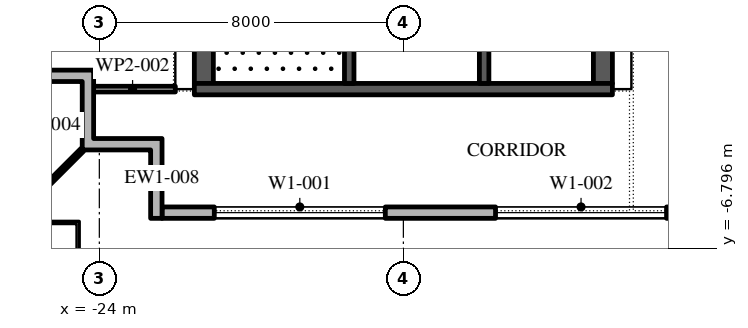
"""IFC4 building model, lengths in metres.
Left out: names, types, materials, properties, quantities, classifications, styles, units other than length and angle.
Written with IfcOpenShell. Run it as: python <this file> out.ifc"""

import sys

from ifc_helpers import new_model, si_unit, direction, frame, frame_2d, origin, place, context, subcontext, project, spatial, polyline, rectangle, outline, extrude, element, fill, save


model = new_model("IFC4")
c1 = context("Model", 3, precision=1e-05, world=origin(), true_north=direction((0.0, 1.0)))
c2 = subcontext(c1, "Body", "Model", "MODEL_VIEW")
j1 = project(units=[si_unit("LENGTHUNIT", "METRE"), si_unit("PLANEANGLEUNIT", "RADIAN")], contexts=[c1])
p1 = place(None, origin())
s1 = spatial("IfcSite", under=j1, at=p1, CompositionType="ELEMENT")
p2 = place(p1, origin())
s2 = spatial("IfcBuilding", under=s1, at=p2, CompositionType="ELEMENT")
p3 = place(p2, frame((0.0, 0.0, 351.0)))
s3 = spatial("IfcBuildingStorey", under=s2, at=p3, CompositionType="ELEMENT", Elevation=351.0)
p4 = place(p3, frame((-22.35, -5.85, 0.0), z_axis=(0.0, 0.0, 1.0), x_axis=(1.0, 0.0, 0.0)))
e1 = element("IfcWall", 1, at=p4, inside=s3, PredefinedType="STANDARD", context=c2, shape_type="SweptSolid", body=[
    extrude(rectangle(XDim=45.0, YDim=0.3, at=frame_2d((22.5, 0.0))), origin(), (0.0, 0.0, 1.0), 4.0),
])
p5 = place(p4, frame((1.375, 0.0, 0.45)))
e2 = element("IfcOpeningElement", 2, at=p5, cuts=e1, PredefinedType="OPENING", context=c2, shape_type="SweptSolid", body=[
    extrude(rectangle(XDim=4.5, YDim=3.05, at=frame_2d((2.25, 1.525))), frame((0.0, 0.16, 0.0), z_axis=(0.0, -1.0, 0.0), x_axis=(1.0, 0.0, 0.0)), (0.0, 0.0, 1.0), 0.32),
])
p6 = place(p4, frame((8.775, 0.0, 0.45)))
e3 = element("IfcOpeningElement", 3, at=p6, cuts=e1, PredefinedType="OPENING", context=c2, shape_type="SweptSolid", body=[
    extrude(rectangle(XDim=4.5, YDim=3.05, at=frame_2d((2.25, 1.525))), frame((0.0, 0.16, 0.0), z_axis=(0.0, -1.0, 0.0), x_axis=(1.0, 0.0, 0.0)), (0.0, 0.0, 1.0), 0.32),
])
p7 = place(p4, frame((17.375, 0.0, 0.0)))
e4 = element("IfcOpeningElement", 4, at=p7, cuts=e1, PredefinedType="OPENING", context=c2, shape_type="SweptSolid", body=[
    extrude(rectangle(XDim=2.4, YDim=3.5, at=frame_2d((1.2, 1.75))), frame((0.0, 0.16, 0.0), z_axis=(0.0, -1.0, 0.0), x_axis=(1.0, 0.0, 0.0)), (0.0, 0.0, 1.0), 0.32),
])
p8 = place(p4, frame((23.875, 0.0, 0.45)))
e5 = element("IfcOpeningElement", 5, at=p8, cuts=e1, PredefinedType="OPENING", context=c2, shape_type="SweptSolid", body=[
    extrude(rectangle(XDim=4.5, YDim=3.05, at=frame_2d((2.25, 1.525))), frame((0.0, 0.16, 0.0), z_axis=(0.0, -1.0, 0.0), x_axis=(1.0, 0.0, 0.0)), (0.0, 0.0, 1.0), 0.32),
])
p9 = place(p4, frame((31.425, 0.0, 0.45)))
e6 = element("IfcOpeningElement", 6, at=p9, cuts=e1, PredefinedType="OPENING", context=c2, shape_type="SweptSolid", body=[
    extrude(rectangle(XDim=4.5, YDim=3.05, at=frame_2d((2.25, 1.525))), frame((0.0, 0.16, 0.0), z_axis=(0.0, -1.0, 0.0), x_axis=(1.0, 0.0, 0.0)), (0.0, 0.0, 1.0), 0.32),
])
p10 = place(p4, frame((38.975, 0.0, 0.45)))
e7 = element("IfcOpeningElement", 7, at=p10, cuts=e1, PredefinedType="OPENING", context=c2, shape_type="SweptSolid", body=[
    extrude(rectangle(XDim=4.5, YDim=3.05, at=frame_2d((2.25, 1.525))), frame((0.0, 0.16, 0.0), z_axis=(0.0, -1.0, 0.0), x_axis=(1.0, 0.0, 0.0)), (0.0, 0.0, 1.0), 0.32),
])
p11 = place(p3, origin())
e8 = element("IfcWall", 8, at=p11, inside=s3, PredefinedType="STANDARD", context=c2, shape_type="SweptSolid", body=[
    extrude(outline(polyline([(-22.65, -4.2), (-24.45, -4.2), (-24.45, -2.4), (-25.95, -2.4), (-25.95, -2.1), (-24.15, -2.1), (-24.15, -3.9), (-22.35, -3.9), (-22.35, -6.0), (-22.65, -6.0), (-22.65, -4.2)])), origin(), (0.0, 0.0, 1.0), 4.0),
])
p12 = place(p3, frame((-24.45, -4.2, -0.05), z_axis=(0.0, 0.0, 1.0), x_axis=(-0.707106781187, -0.707106781187, 0.0)))
e9 = element("IfcWall", 9, at=p12, inside=s3, PredefinedType="STANDARD", context=c2, shape_type="SweptSolid", body=[
    extrude(rectangle(XDim=2.667, YDim=0.1, at=frame_2d((1.333, 0.0))), origin(), (0.0, 0.0, 1.0), 4.05),
])
p13 = place(p3, frame((-21.25, -2.45, 0.0), z_axis=(0.0, 0.0, 1.0), x_axis=(0.0, 1.0, 0.0)))
e10 = element("IfcWall", 10, at=p13, inside=s3, PredefinedType="SHEAR", context=c2, shape_type="SweptSolid", body=[
    extrude(rectangle(XDim=27.9, YDim=0.5, at=frame_2d((13.95, 0.0))), origin(), (0.0, 0.0, 1.0), 4.0),
])
p14 = place(p13, frame((5.05, 0.0, 0.0)))
e11 = element("IfcOpeningElement", 11, at=p14, cuts=e10, PredefinedType="OPENING", context=c2, shape_type="SweptSolid", body=[
    extrude(rectangle(XDim=1.2, YDim=2.1, at=frame_2d((0.6, 1.05))), frame((0.0, 0.26, 0.0), z_axis=(0.0, -1.0, 0.0), x_axis=(1.0, 0.0, 0.0)), (0.0, 0.0, 1.0), 0.52),
])
p15 = place(p13, frame((21.65, 0.0, 0.0)))
e12 = element("IfcOpeningElement", 12, at=p15, cuts=e10, PredefinedType="OPENING", context=c2, shape_type="SweptSolid", body=[
    extrude(rectangle(XDim=1.2, YDim=2.1, at=frame_2d((0.6, 1.05))), frame((0.0, 0.26, 0.0), z_axis=(0.0, -1.0, 0.0), x_axis=(1.0, 0.0, 0.0)), (0.0, 0.0, 1.0), 0.52),
])
p16 = place(p3, frame((-10.75, -2.45, 0.0), z_axis=(0.0, 0.0, 1.0), x_axis=(0.0, 1.0, 0.0)))
e13 = element("IfcWall", 13, at=p16, inside=s3, PredefinedType="SHEAR", context=c2, shape_type="SweptSolid", body=[
    extrude(rectangle(XDim=27.9, YDim=0.5, at=frame_2d((13.95, 0.0))), origin(), (0.0, 0.0, 1.0), 4.0),
])
p17 = place(p16, frame((23.65, 0.0, 0.0)))
e14 = element("IfcOpeningElement", 14, at=p17, cuts=e13, PredefinedType="OPENING", context=c2, shape_type="SweptSolid", body=[
    extrude(rectangle(XDim=2.4, YDim=2.1, at=frame_2d((1.2, 1.05))), frame((0.0, 0.26, 0.0), z_axis=(0.0, -1.0, 0.0), x_axis=(1.0, 0.0, 0.0)), (0.0, 0.0, 1.0), 0.52),
])
p18 = place(p16, frame((1.387, 0.0, 0.0)))
e15 = element("IfcOpeningElement", 15, at=p18, cuts=e13, PredefinedType="OPENING", context=c2, shape_type="SweptSolid", body=[
    extrude(rectangle(XDim=0.9, YDim=2.1, at=frame_2d((0.45, 1.05))), frame((0.0, 0.26, 0.0), z_axis=(0.0, -1.0, 0.0), x_axis=(1.0, 0.0, 0.0)), (0.0, 0.0, 1.0), 0.52),
])
p19 = place(p16, frame((4.562, 0.0, 0.0)))
e16 = element("IfcOpeningElement", 16, at=p19, cuts=e13, PredefinedType="OPENING", context=c2, shape_type="SweptSolid", body=[
    extrude(rectangle(XDim=1.0, YDim=2.1, at=frame_2d((0.5, 1.05))), frame((0.0, 0.26, 0.0), z_axis=(0.0, -1.0, 0.0), x_axis=(1.0, 0.0, 0.0)), (0.0, 0.0, 1.0), 0.52),
])
p20 = place(p3, frame((-21.5, -2.6, 0.0), z_axis=(0.0, 0.0, 1.0), x_axis=(1.0, 0.0, 0.0)))
e17 = element("IfcWall", 17, at=p20, inside=s3, PredefinedType="SHEAR", context=c2, shape_type="SweptSolid", body=[
    extrude(rectangle(XDim=11.0, YDim=0.3, at=frame_2d((5.5, 0.0))), origin(), (0.0, 0.0, 1.0), 4.0),
])
p21 = place(p3, frame((-17.425, -2.45, 0.0), z_axis=(0.0, 0.0, 1.0), x_axis=(0.0, 1.0, 0.0)))
e18 = element("IfcWall", 18, at=p21, inside=s3, PredefinedType="SHEAR", context=c2, shape_type="SweptSolid", body=[
    extrude(rectangle(XDim=6.3, YDim=0.25, at=frame_2d((3.15, 0.0))), origin(), (0.0, 0.0, 1.0), 4.0),
])
p22 = place(p21, frame((5.05, 0.0, 0.0)))
e19 = element("IfcOpeningElement", 19, at=p22, cuts=e18, PredefinedType="OPENING", context=c2, shape_type="SweptSolid", body=[
    extrude(rectangle(XDim=1.2, YDim=2.1, at=frame_2d((0.6, 1.05))), frame((0.0, 0.135, 0.0), z_axis=(0.0, -1.0, 0.0), x_axis=(1.0, 0.0, 0.0)), (0.0, 0.0, 1.0), 0.27),
])
p23 = place(p3, frame((-13.875, -2.45, 0.0), z_axis=(0.0, 0.0, 1.0), x_axis=(0.0, 1.0, 0.0)))
e20 = element("IfcWall", 20, at=p23, inside=s3, PredefinedType="SHEAR", context=c2, shape_type="SweptSolid", body=[
    extrude(rectangle(XDim=21.3, YDim=0.25, at=frame_2d((10.65, 0.0))), origin(), (0.0, 0.0, 1.0), 4.0),
])
p24 = place(p23, frame((9.846, 0.0, 0.0)))
e21 = element("IfcOpeningElement", 21, at=p24, cuts=e20, PredefinedType="OPENING", context=c2, shape_type="SweptSolid", body=[
    extrude(rectangle(XDim=0.9, YDim=2.1, at=frame_2d((0.45, 1.05))), frame((0.0, 0.135, 0.0), z_axis=(0.0, -1.0, 0.0), x_axis=(1.0, 0.0, 0.0)), (0.0, 0.0, 1.0), 0.27),
])
p25 = place(p23, frame((12.911, 0.0, 0.0)))
e22 = element("IfcOpeningElement", 22, at=p25, cuts=e20, PredefinedType="OPENING", context=c2, shape_type="SweptSolid", body=[
    extrude(rectangle(XDim=0.9, YDim=2.1, at=frame_2d((0.45, 1.05))), frame((0.0, 0.135, 0.0), z_axis=(0.0, -1.0, 0.0), x_axis=(1.0, 0.0, 0.0)), (0.0, 0.0, 1.0), 0.27),
])
p26 = place(p23, frame((6.971, 0.0, 0.0)))
e23 = element("IfcOpeningElement", 23, at=p26, cuts=e20, PredefinedType="OPENING", context=c2, shape_type="SweptSolid", body=[
    extrude(rectangle(XDim=1.1, YDim=2.1, at=frame_2d((0.55, 1.05))), frame((0.0, 0.135, 0.0), z_axis=(0.0, -1.0, 0.0), x_axis=(1.0, 0.0, 0.0)), (0.0, 0.0, 1.0), 0.27),
])
p27 = place(p23, frame((15.543, 0.0, 0.0)))
e24 = element("IfcOpeningElement", 24, at=p27, cuts=e20, PredefinedType="OPENING", context=c2, shape_type="SweptSolid", body=[
    extrude(rectangle(XDim=1.1, YDim=2.1, at=frame_2d((0.55, 1.05))), frame((0.0, 0.135, 0.0), z_axis=(0.0, -1.0, 0.0), x_axis=(1.0, 0.0, 0.0)), (0.0, 0.0, 1.0), 0.27),
])
p28 = place(p23, frame((17.686, 0.0, 0.0)))
e25 = element("IfcOpeningElement", 25, at=p28, cuts=e20, PredefinedType="OPENING", context=c2, shape_type="SweptSolid", body=[
    extrude(rectangle(XDim=1.1, YDim=2.1, at=frame_2d((0.55, 1.05))), frame((0.0, 0.135, 0.0), z_axis=(0.0, -1.0, 0.0), x_axis=(1.0, 0.0, 0.0)), (0.0, 0.0, 1.0), 0.27),
])
p29 = place(p23, frame((19.829, 0.0, 0.0)))
e26 = element("IfcOpeningElement", 26, at=p29, cuts=e20, PredefinedType="OPENING", context=c2, shape_type="SweptSolid", body=[
    extrude(rectangle(XDim=1.1, YDim=2.1, at=frame_2d((0.55, 1.05))), frame((0.0, 0.135, 0.0), z_axis=(0.0, -1.0, 0.0), x_axis=(1.0, 0.0, 0.0)), (0.0, 0.0, 1.0), 0.27),
])
p30 = place(p3, frame((-24.25, -2.6, 0.0), z_axis=(0.0, 0.0, 1.0), x_axis=(1.0, 0.0, 0.0)))
e27 = element("IfcWall", 27, at=p30, inside=s3, PredefinedType="PARTITIONING", context=c2, shape_type="SweptSolid", body=[
    extrude(rectangle(XDim=2.25, YDim=0.15, at=frame_2d((1.125, 0.0))), origin(), (0.0, 0.0, 1.0), 4.0),
])
p31 = place(p5, origin())
e28 = element("IfcWindow", 28, at=p31, inside=s3, PartitioningType="DOUBLE_PANEL_VERTICAL", PredefinedType="WINDOW", context=c2, shape_type="SweptSolid", body=[
    extrude(rectangle(XDim=4.5, YDim=3.05, at=frame_2d((2.25, 1.525))), frame((0.0, 0.03, 0.0), z_axis=(0.0, -1.0, 0.0), x_axis=(1.0, 0.0, 0.0)), (0.0, 0.0, 1.0), 0.06),
])
fill(e2, e28)
p32 = place(p6, origin())
e29 = element("IfcWindow", 29, at=p32, inside=s3, PartitioningType="DOUBLE_PANEL_VERTICAL", PredefinedType="WINDOW", context=c2, shape_type="SweptSolid", body=[
    extrude(rectangle(XDim=4.5, YDim=3.05, at=frame_2d((2.25, 1.525))), frame((0.0, 0.03, 0.0), z_axis=(0.0, -1.0, 0.0), x_axis=(1.0, 0.0, 0.0)), (0.0, 0.0, 1.0), 0.06),
])
fill(e3, e29)
save(model, sys.argv[1])
